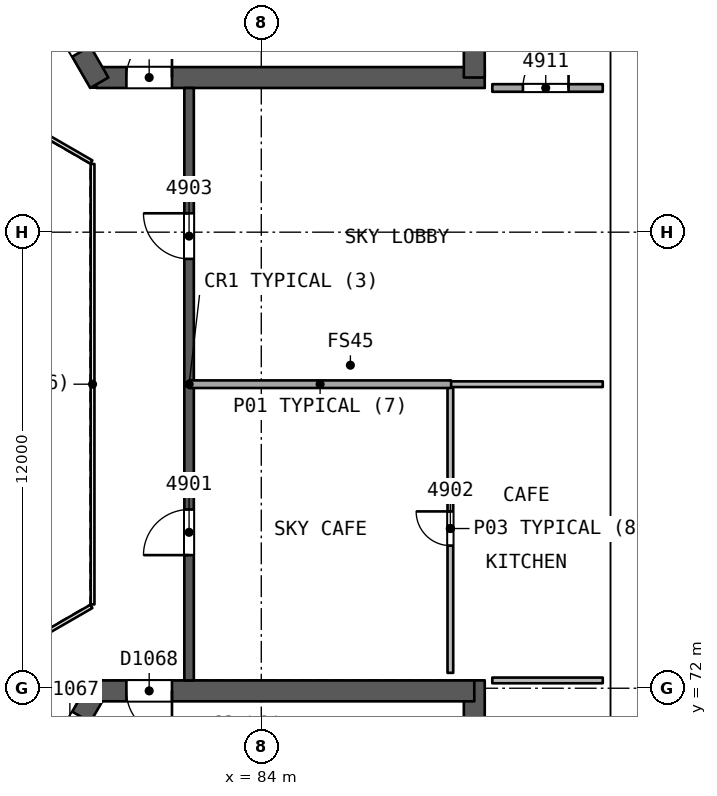
"""IFC4 building model, lengths in metres.
Left out: names, types, materials, properties, quantities, classifications, styles, units other than length and angle.
Written with IfcOpenShell. Run it as: python <this file> out.ifc"""

import sys

from ifc_helpers import new_model, si_unit, direction, frame, frame_2d, origin, place, context, subcontext, project, spatial, rectangle, extrude, element, fill, save


model = new_model("IFC4")
c1 = context("Model", 3, precision=1e-05, world=origin(), true_north=direction((0.0, 1.0)))
c2 = subcontext(c1, "Body", "Model", "MODEL_VIEW")
j1 = project(units=[si_unit("LENGTHUNIT", "METRE"), si_unit("PLANEANGLEUNIT", "RADIAN")], contexts=[c1])
p1 = place(None, origin())
s1 = spatial("IfcSite", under=j1, at=p1, CompositionType="ELEMENT")
p2 = place(p1, origin())
s2 = spatial("IfcBuilding", under=s1, at=p2, CompositionType="ELEMENT")
p3 = place(p2, frame((0.0, 0.0, 201.4)))
s3 = spatial("IfcBuildingStorey", under=s2, at=p3, CompositionType="ELEMENT", Elevation=201.4)
p4 = place(p3, frame((79.659, 88.069, 0.0), z_axis=(0.0, 0.0, 1.0), x_axis=(1.0, 0.0, 0.0)))
e1 = element("IfcWall", 1, at=p4, inside=s3, PredefinedType="SHEAR", context=c2, shape_type="SweptSolid", body=[
    extrude(rectangle(XDim=10.221, YDim=0.55, at=frame_2d((5.111, 0.0))), origin(), (0.0, 0.0, 1.0), 4.4),
])
p5 = place(p4, frame((0.791, 0.0, 0.0)))
e2 = element("IfcOpeningElement", 2, at=p5, cuts=e1, PredefinedType="OPENING", context=c2, shape_type="SweptSolid", body=[
    extrude(rectangle(XDim=1.2, YDim=2.1, at=frame_2d((0.6, 1.05))), frame((0.0, 0.286, 0.0), z_axis=(0.0, -1.0, 0.0), x_axis=(1.0, 0.0, 0.0)), (0.0, 0.0, 1.0), 0.571),
])
p6 = place(p3, frame((89.605, 88.069, 0.0), z_axis=(0.0, 0.0, 1.0), x_axis=(0.0, 1.0, 0.0)))
e3 = element("IfcWall", 3, at=p6, inside=s3, PredefinedType="SHEAR", context=c2, shape_type="SweptSolid", body=[
    extrude(rectangle(XDim=14.058, YDim=0.55, at=frame_2d((7.029, 0.0))), origin(), (0.0, 0.0, 1.0), 4.4),
])
p7 = place(p3, frame((74.686, 96.683, 0.0), z_axis=(0.0, 0.0, 1.0), x_axis=(0.499997818338, -0.866026663364, 0.0)))
e4 = element("IfcWall", 4, at=p7, inside=s3, PredefinedType="SHEAR", context=c2, shape_type="SweptSolid", body=[
    extrude(rectangle(XDim=10.105, YDim=0.55, at=frame_2d((5.052, 0.0))), origin(), (0.0, 0.0, 1.0), 4.4),
])
p8 = place(p7, frame((7.955, 0.0, 0.0)))
e5 = element("IfcOpeningElement", 5, at=p8, cuts=e4, PredefinedType="OPENING", context=c2, shape_type="SweptSolid", body=[
    extrude(rectangle(XDim=1.2, YDim=2.1, at=frame_2d((0.6, 1.05))), frame((0.0, 0.286, 0.0), z_axis=(0.0, -1.0, 0.0), x_axis=(1.0, 0.0, 0.0)), (0.0, 0.0, 1.0), 0.571),
])
p9 = place(p3, frame((79.659, 71.931, 0.0), z_axis=(0.0, 0.0, 1.0), x_axis=(-0.500000202252, -0.866025287014, 0.0)))
e6 = element("IfcWall", 6, at=p9, inside=s3, PredefinedType="SHEAR", context=c2, shape_type="SweptSolid", body=[
    extrude(rectangle(XDim=10.221, YDim=0.55, at=frame_2d((5.111, 0.0))), origin(), (0.0, 0.0, 1.0), 4.4),
])
p10 = place(p9, frame((0.791, 0.0, 0.0)))
e7 = element("IfcOpeningElement", 7, at=p10, cuts=e6, PredefinedType="OPENING", context=c2, shape_type="SweptSolid", body=[
    extrude(rectangle(XDim=1.2, YDim=2.1, at=frame_2d((0.6, 1.05))), frame((0.0, 0.286, 0.0), z_axis=(0.0, -1.0, 0.0), x_axis=(1.0, 0.0, 0.0)), (0.0, 0.0, 1.0), 0.571),
])
p11 = place(p3, frame((89.605, 58.031, 0.0), z_axis=(0.0, 0.0, 1.0), x_axis=(0.0, 1.0, 0.0)))
e8 = element("IfcWall", 8, at=p11, inside=s3, PredefinedType="SHEAR", context=c2, shape_type="SweptSolid", body=[
    extrude(rectangle(XDim=14.175, YDim=0.55, at=frame_2d((7.087, 0.0))), origin(), (0.0, 0.0, 1.0), 4.4),
])
p12 = place(p3, frame((89.605, 71.931, 0.0), z_axis=(0.0, 0.0, 1.0), x_axis=(-1.0, 0.0, 0.0)))
e9 = element("IfcWall", 9, at=p12, inside=s3, PredefinedType="SHEAR", context=c2, shape_type="SweptSolid", body=[
    extrude(rectangle(XDim=10.105, YDim=0.55, at=frame_2d((5.052, 0.0))), origin(), (0.0, 0.0, 1.0), 4.4),
])
p13 = place(p12, frame((7.955, 0.0, 0.0)))
e10 = element("IfcOpeningElement", 10, at=p13, cuts=e9, PredefinedType="OPENING", context=c2, shape_type="SweptSolid", body=[
    extrude(rectangle(XDim=1.2, YDim=2.1, at=frame_2d((0.6, 1.05))), frame((0.0, 0.286, 0.0), z_axis=(0.0, -1.0, 0.0), x_axis=(1.0, 0.0, 0.0)), (0.0, 0.0, 1.0), 0.571),
])
p14 = place(p3, frame((82.1, 72.206, 0.0), z_axis=(0.0, 0.0, 1.0), x_axis=(0.0, 1.0, 0.0)))
e11 = element("IfcWall", 11, at=p14, inside=s3, PredefinedType="SHEAR", context=c2, shape_type="SweptSolid", body=[
    extrude(rectangle(XDim=15.588, YDim=0.25, at=frame_2d((7.794, 0.0))), origin(), (0.0, 0.0, 1.0), 4.0),
])
p15 = place(p14, frame((3.297, 0.0, 0.0)))
e12 = element("IfcOpeningElement", 12, at=p15, cuts=e11, PredefinedType="OPENING", context=c2, shape_type="SweptSolid", body=[
    extrude(rectangle(XDim=1.2, YDim=2.4, at=frame_2d((0.6, 1.2))), frame((0.0, 0.135, 0.0), z_axis=(0.0, -1.0, 0.0), x_axis=(1.0, 0.0, 0.0)), (0.0, 0.0, 1.0), 0.271),
])
p16 = place(p14, frame((11.091, 0.0, 0.0)))
e13 = element("IfcOpeningElement", 13, at=p16, cuts=e11, PredefinedType="OPENING", context=c2, shape_type="SweptSolid", body=[
    extrude(rectangle(XDim=1.2, YDim=2.4, at=frame_2d((0.6, 1.2))), frame((0.0, 0.135, 0.0), z_axis=(0.0, -1.0, 0.0), x_axis=(1.0, 0.0, 0.0)), (0.0, 0.0, 1.0), 0.271),
])
p17 = place(p3, frame((88.976, 72.405, 0.0), z_axis=(0.0, 0.0, 1.0), x_axis=(0.0, 1.0, 0.0)))
e14 = element("IfcWall", 14, at=p17, inside=s3, PredefinedType="PARTITIONING", context=c2, shape_type="SweptSolid", body=[
    extrude(rectangle(XDim=7.595, YDim=0.15, at=frame_2d((3.798, 0.0))), origin(), (0.0, 0.0, 1.0), 4.0),
])
p18 = place(p17, frame((3.348, 0.0, 0.0)))
e15 = element("IfcOpeningElement", 15, at=p18, cuts=e14, PredefinedType="OPENING", context=c2, shape_type="SweptSolid", body=[
    extrude(rectangle(XDim=0.9, YDim=2.1, at=frame_2d((0.45, 1.05))), frame((0.0, 0.085, 0.0), z_axis=(0.0, -1.0, 0.0), x_axis=(1.0, 0.0, 0.0)), (0.0, 0.0, 1.0), 0.171),
])
p19 = place(p3, frame((88.996, 80.0, 0.0), z_axis=(0.0, 0.0, 1.0), x_axis=(-1.0, 0.0, 0.0)))
e16 = element("IfcWall", 16, at=p19, inside=s3, PredefinedType="PARTITIONING", context=c2, shape_type="SweptSolid", body=[
    extrude(rectangle(XDim=6.896, YDim=0.2, at=frame_2d((3.448, 0.0))), origin(), (0.0, 0.0, 1.0), 4.0),
])
p20 = place(p3, frame((92.986, 80.0, 0.0), z_axis=(0.0, 0.0, 1.0), x_axis=(-1.0, 0.0, 0.0)))
e17 = element("IfcWall", 17, at=p20, inside=s3, PredefinedType="PARTITIONING", context=c2, shape_type="SweptSolid", body=[
    extrude(rectangle(XDim=4.03, YDim=0.15, at=frame_2d((2.015, 0.0))), origin(), (0.0, 0.0, 1.0), 4.0),
])
p21 = place(p3, frame((92.986, 72.206, 0.0), z_axis=(0.0, 0.0, 1.0), x_axis=(-1.0, 0.0, 0.0)))
e18 = element("IfcWall", 18, at=p21, inside=s3, PredefinedType="PARTITIONING", context=c2, shape_type="SweptSolid", body=[
    extrude(rectangle(XDim=2.906, YDim=0.15, at=frame_2d((1.453, 0.0))), origin(), (0.0, 0.0, 1.0), 4.0),
])
p22 = place(p3, frame((90.079, 87.794, 0.0), z_axis=(0.0, 0.0, 1.0), x_axis=(1.0, 0.0, 0.0)))
e19 = element("IfcWall", 19, at=p22, inside=s3, PredefinedType="PARTITIONING", context=c2, shape_type="SweptSolid", body=[
    extrude(rectangle(XDim=2.906, YDim=0.2, at=frame_2d((1.453, 0.0))), origin(), (0.0, 0.0, 1.0), 4.0),
])
p23 = place(p22, frame((0.806, 0.0, 0.0)))
e20 = element("IfcOpeningElement", 20, at=p23, cuts=e19, PredefinedType="OPENING", context=c2, shape_type="SweptSolid", body=[
    extrude(rectangle(XDim=1.2, YDim=2.4, at=frame_2d((0.6, 1.2))), frame((0.0, 0.11, 0.0), z_axis=(0.0, -1.0, 0.0), x_axis=(1.0, 0.0, 0.0)), (0.0, 0.0, 1.0), 0.221),
])
p24 = place(p3, frame((79.56, 74.206, 0.0), z_axis=(0.0, 0.0, 1.0), x_axis=(0.0, 1.0, 0.0)))
e21 = element("IfcWall", 21, at=p24, inside=s3, PredefinedType="PARTITIONING", context=c2, shape_type="SweptSolid", body=[
    extrude(rectangle(XDim=11.588, YDim=0.1, at=frame_2d((5.794, 0.0))), origin(), (0.0, 0.0, 1.0), 4.0),
])
for number, where, z_axis, x_axis in (
    (22, (79.53, 85.846, 0.0), (0.0, 0.0, 1.0), (-0.866, 0.5, 0.0)),
    (23, (77.798, 73.154, 0.0), (0.0, 0.0, 1.0), (0.866, 0.5, 0.0)),
):
    element("IfcWall", number, at=place(p3, frame(where, z_axis=z_axis, x_axis=x_axis)), inside=s3, PredefinedType="PARTITIONING", context=c2, shape_type="SweptSolid", body=[
        extrude(rectangle(XDim=2.0, YDim=0.1, at=frame_2d((1.0, 0.0))), origin(), (0.0, 0.0, 1.0), 4.0),
    ])
p25 = place(p15, origin())
e24 = element("IfcDoor", 24, at=p25, inside=s3, OperationType="SINGLE_SWING_LEFT", PredefinedType="NOTDEFINED", context=c2, shape_type="SweptSolid", body=[
    extrude(rectangle(XDim=1.2, YDim=2.4, at=frame_2d((0.6, 1.2))), frame((0.0, 0.025, 0.0), z_axis=(0.0, -1.0, 0.0), x_axis=(1.0, 0.0, 0.0)), (0.0, 0.0, 1.0), 0.05),
])
fill(e12, e24)
p26 = place(p18, origin())
e25 = element("IfcDoor", 25, at=p26, inside=s3, OperationType="SINGLE_SWING_RIGHT", PredefinedType="NOTDEFINED", context=c2, shape_type="SweptSolid", body=[
    extrude(rectangle(XDim=0.9, YDim=2.1, at=frame_2d((0.45, 1.05))), frame((0.0, 0.025, 0.0), z_axis=(0.0, -1.0, 0.0), x_axis=(1.0, 0.0, 0.0)), (0.0, 0.0, 1.0), 0.05),
])
fill(e15, e25)
p27 = place(p16, origin())
e26 = element("IfcDoor", 26, at=p27, inside=s3, OperationType="SINGLE_SWING_RIGHT", PredefinedType="NOTDEFINED", context=c2, shape_type="SweptSolid", body=[
    extrude(rectangle(XDim=1.2, YDim=2.4, at=frame_2d((0.6, 1.2))), frame((0.0, 0.025, 0.0), z_axis=(0.0, -1.0, 0.0), x_axis=(1.0, 0.0, 0.0)), (0.0, 0.0, 1.0), 0.05),
])
fill(e13, e26)
p28 = place(p23, origin())
e27 = element("IfcDoor", 27, at=p28, inside=s3, OperationType="SINGLE_SWING_RIGHT", PredefinedType="NOTDEFINED", context=c2, shape_type="SweptSolid", body=[
    extrude(rectangle(XDim=1.2, YDim=2.4, at=frame_2d((0.6, 1.2))), frame((0.0, 0.025, 0.0), z_axis=(0.0, -1.0, 0.0), x_axis=(1.0, 0.0, 0.0)), (0.0, 0.0, 1.0), 0.05),
])
fill(e20, e27)
p29 = place(p5, origin())
e28 = element("IfcDoor", 28, at=p29, inside=s3, OperationType="SINGLE_SWING_RIGHT", PredefinedType="NOTDEFINED", context=c2, shape_type="SweptSolid", body=[
    extrude(rectangle(XDim=1.2, YDim=2.1, at=frame_2d((0.6, 1.05))), frame((0.0, 0.025, 0.0), z_axis=(0.0, -1.0, 0.0), x_axis=(1.0, 0.0, 0.0)), (0.0, 0.0, 1.0), 0.05),
])
fill(e2, e28)
p30 = place(p13, origin())
e29 = element("IfcDoor", 29, at=p30, inside=s3, OperationType="SINGLE_SWING_LEFT", PredefinedType="NOTDEFINED", context=c2, shape_type="SweptSolid", body=[
    extrude(rectangle(XDim=1.2, YDim=2.1, at=frame_2d((0.6, 1.05))), frame((0.0, 0.025, 0.0), z_axis=(0.0, -1.0, 0.0), x_axis=(1.0, 0.0, 0.0)), (0.0, 0.0, 1.0), 0.05),
])
fill(e10, e29)
save(model, sys.argv[1])
